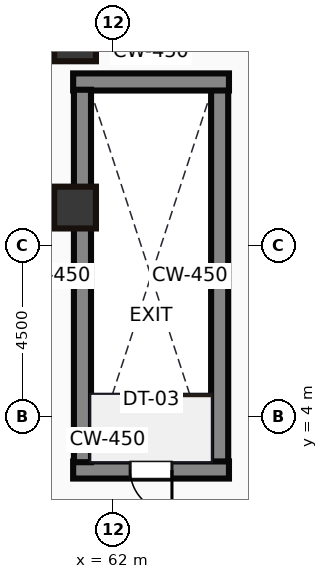
"""IFC4 building model, lengths in metres.
Left out: names, types, materials, properties, quantities, classifications, styles, units other than length and angle.
Written with IfcOpenShell. Run it as: python <this file> out.ifc"""

import sys

from ifc_helpers import new_model, si_unit, direction, frame, frame_2d, origin, origin_2d, place, context, subcontext, project, spatial, rectangle, hollow_rectangle, extrude, source, transform, mapped, element, fill, save


model = new_model("IFC4")
c1 = context("Model", 3, precision=1e-05, world=origin(), true_north=direction((0.0, 1.0)))
c2 = subcontext(c1, "Body", "Model", "MODEL_VIEW")
j1 = project(units=[si_unit("LENGTHUNIT", "METRE"), si_unit("PLANEANGLEUNIT", "RADIAN")], contexts=[c1])
p1 = place(None, origin())
s1 = spatial("IfcSite", under=j1, at=p1, CompositionType="ELEMENT")
p2 = place(p1, origin())
s2 = spatial("IfcBuilding", under=s1, at=p2, CompositionType="ELEMENT")
p3 = place(p2, frame((0.0, 0.0, 26.0)))
s3 = spatial("IfcBuildingStorey", under=s2, at=p3, CompositionType="ELEMENT", Elevation=26.0)
m1 = source(origin(), c2, "Body", "SweptSolid", [
    extrude(hollow_rectangle(XDim=1.1, YDim=1.3, WallThickness=0.055, at=origin_2d()), origin(), (0.0, 0.0, 1.0), 6.5),
])
p4 = place(p3, frame((61.0, 14.0, 0.0), z_axis=(0.0, 0.0, 1.0), x_axis=(1.0, 0.0, 0.0)))
e1 = element("IfcColumn", 1, at=p4, inside=s3, PredefinedType="PILASTER", context=c2, shape_type="MappedRepresentation", body=[
    mapped(m1, transform((0.0, 0.0, 0.0))),
])
m2 = source(origin(), c2, "Body", "SweptSolid", [
    extrude(hollow_rectangle(XDim=1.1, YDim=1.1, WallThickness=0.05, at=origin_2d()), origin(), (0.0, 0.0, 1.0), 6.5),
])
p5 = place(p3, frame((61.0, 9.5, 0.0), z_axis=(0.0, 0.0, 1.0), x_axis=(1.0, 0.0, 0.0)))
e2 = element("IfcColumn", 2, at=p5, inside=s3, PredefinedType="PILASTER", context=c2, shape_type="MappedRepresentation", body=[
    mapped(m2, transform((0.0, 0.0, 0.0))),
])
m3 = source(origin(), c2, "Body", "SweptSolid", [
    extrude(rectangle(XDim=4.1, YDim=0.45, at=frame_2d((2.05, 0.0))), origin(), (0.0, 0.0, 1.0), 6.25),
])
p6 = place(p3, frame((60.95, 2.595, 0.0), z_axis=(0.0, 0.0, 1.0), x_axis=(1.0, 0.0, 0.0)))
e3 = element("IfcWall", 3, at=p6, inside=s3, PredefinedType="SHEAR", context=c2, shape_type="MappedRepresentation", body=[
    mapped(m3, transform((0.0, 0.0, 0.0))),
])
p7 = place(p6, frame((1.5, 0.0, 0.0)))
e4 = element("IfcOpeningElement", 4, at=p7, cuts=e3, PredefinedType="OPENING", context=c2, shape_type="SweptSolid", body=[
    extrude(rectangle(XDim=1.1, YDim=2.15, at=frame_2d((0.55, 1.075))), frame((0.0, 0.235, 0.0), z_axis=(0.0, -1.0, 0.0), x_axis=(1.0, 0.0, 0.0)), (0.0, 0.0, 1.0), 0.47),
])
m4 = source(origin(), c2, "Body", "SweptSolid", [
    extrude(rectangle(XDim=9.8, YDim=0.45, at=frame_2d((4.9, 0.0))), origin(), (0.0, 0.0, 1.0), 6.25),
])
for number, where, z_axis, x_axis in (
    (5, (61.195, 2.8, 0.0), (0.0, 0.0, 1.0), (0.0, 1.0, 0.0)),
    (6, (64.805, 2.8, 0.0), (0.0, 0.0, 1.0), (0.0, 1.0, 0.0)),
):
    element("IfcWall", number, at=place(p3, frame(where, z_axis=z_axis, x_axis=x_axis)), inside=s3, PredefinedType="SHEAR", context=c2, shape_type="MappedRepresentation", body=[
        mapped(m4, transform((0.0, 0.0, 0.0))),
    ])
p8 = place(p3, frame((60.95, 12.805, 0.0), z_axis=(0.0, 0.0, 1.0), x_axis=(1.0, 0.0, 0.0)))
e7 = element("IfcWall", 7, at=p8, inside=s3, PredefinedType="SHEAR", context=c2, shape_type="MappedRepresentation", body=[
    mapped(m3, transform((0.0, 0.0, 0.0))),
])
m5 = source(origin(), c2, "Body", "SweptSolid", [
    extrude(rectangle(XDim=1.1, YDim=2.15, at=frame_2d((0.55, 1.075))), frame((0.0, 0.025, 0.0), z_axis=(0.0, -1.0, 0.0), x_axis=(1.0, 0.0, 0.0)), (0.0, 0.0, 1.0), 0.05),
])
p9 = place(p7, origin())
e8 = element("IfcDoor", 8, at=p9, inside=s3, OperationType="SINGLE_SWING_RIGHT", PredefinedType="DOOR", context=c2, shape_type="MappedRepresentation", body=[
    mapped(m5, transform((0.0, 0.0, 0.0))),
])
fill(e4, e8)
save(model, sys.argv[1])
